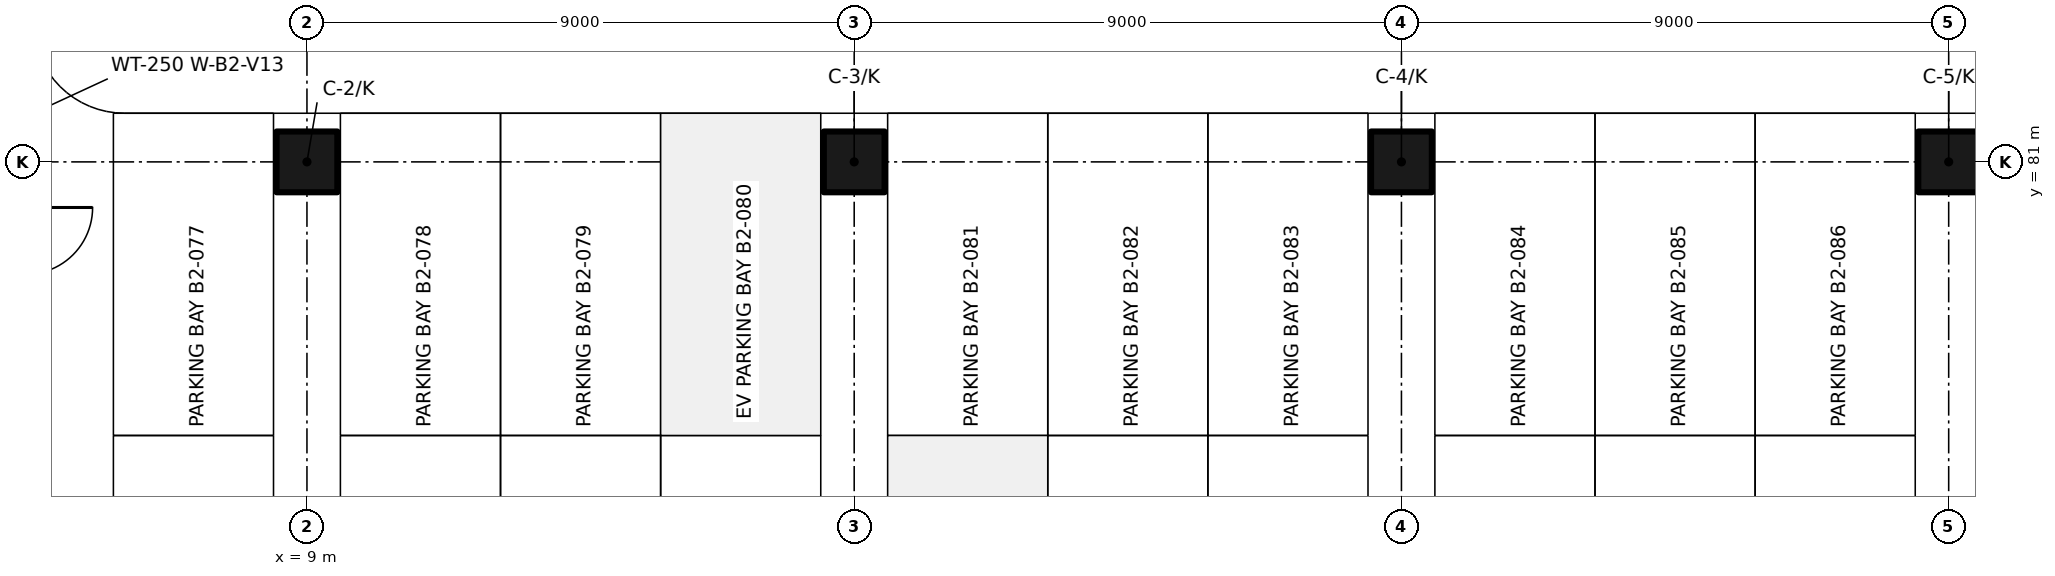
"""IFC4 building model, lengths in metres.
Left out: names, types, materials, properties, quantities, classifications, styles, units other than length and angle.
Written with IfcOpenShell. Run it as: python <this file> out.ifc"""

import sys

from ifc_helpers import new_model, si_unit, direction, frame, origin, origin_2d, place, context, subcontext, project, spatial, rectangle, extrude, element, save


model = new_model("IFC4")
c1 = context("Model", 3, precision=1e-05, world=origin(), true_north=direction((0.0, 1.0)))
c2 = subcontext(c1, "Body", "Model", "MODEL_VIEW")
j1 = project(units=[si_unit("LENGTHUNIT", "METRE"), si_unit("PLANEANGLEUNIT", "RADIAN")], contexts=[c1])
p1 = place(None, origin())
s1 = spatial("IfcSite", under=j1, at=p1, CompositionType="ELEMENT")
p2 = place(p1, origin())
s2 = spatial("IfcBuilding", under=s1, at=p2, CompositionType="ELEMENT")
p3 = place(p2, frame((0.0, 0.0, -9.9)))
s3 = spatial("IfcBuildingStorey", under=s2, at=p3, CompositionType="ELEMENT", Elevation=-9.9)
for number, where, z_axis, x_axis in (
    (1, (9.0, 81.0, 0.0), (0.0, 0.0, 1.0), (1.0, 0.0, 0.0)),
    (2, (18.0, 81.0, 0.0), (0.0, 0.0, 1.0), (1.0, 0.0, 0.0)),
    (3, (27.0, 81.0, 0.0), (0.0, 0.0, 1.0), (1.0, 0.0, 0.0)),
    (4, (36.0, 81.0, 0.0), (0.0, 0.0, 1.0), (1.0, 0.0, 0.0)),
):
    element("IfcColumn", number, at=place(p3, frame(where, z_axis=z_axis, x_axis=x_axis)), inside=s3, PredefinedType="COLUMN", context=c2, shape_type="SweptSolid", body=[
        extrude(rectangle(XDim=1.0, YDim=1.0, at=origin_2d()), origin(), (0.0, 0.0, 1.0), 4.8),
    ])
save(model, sys.argv[1])
